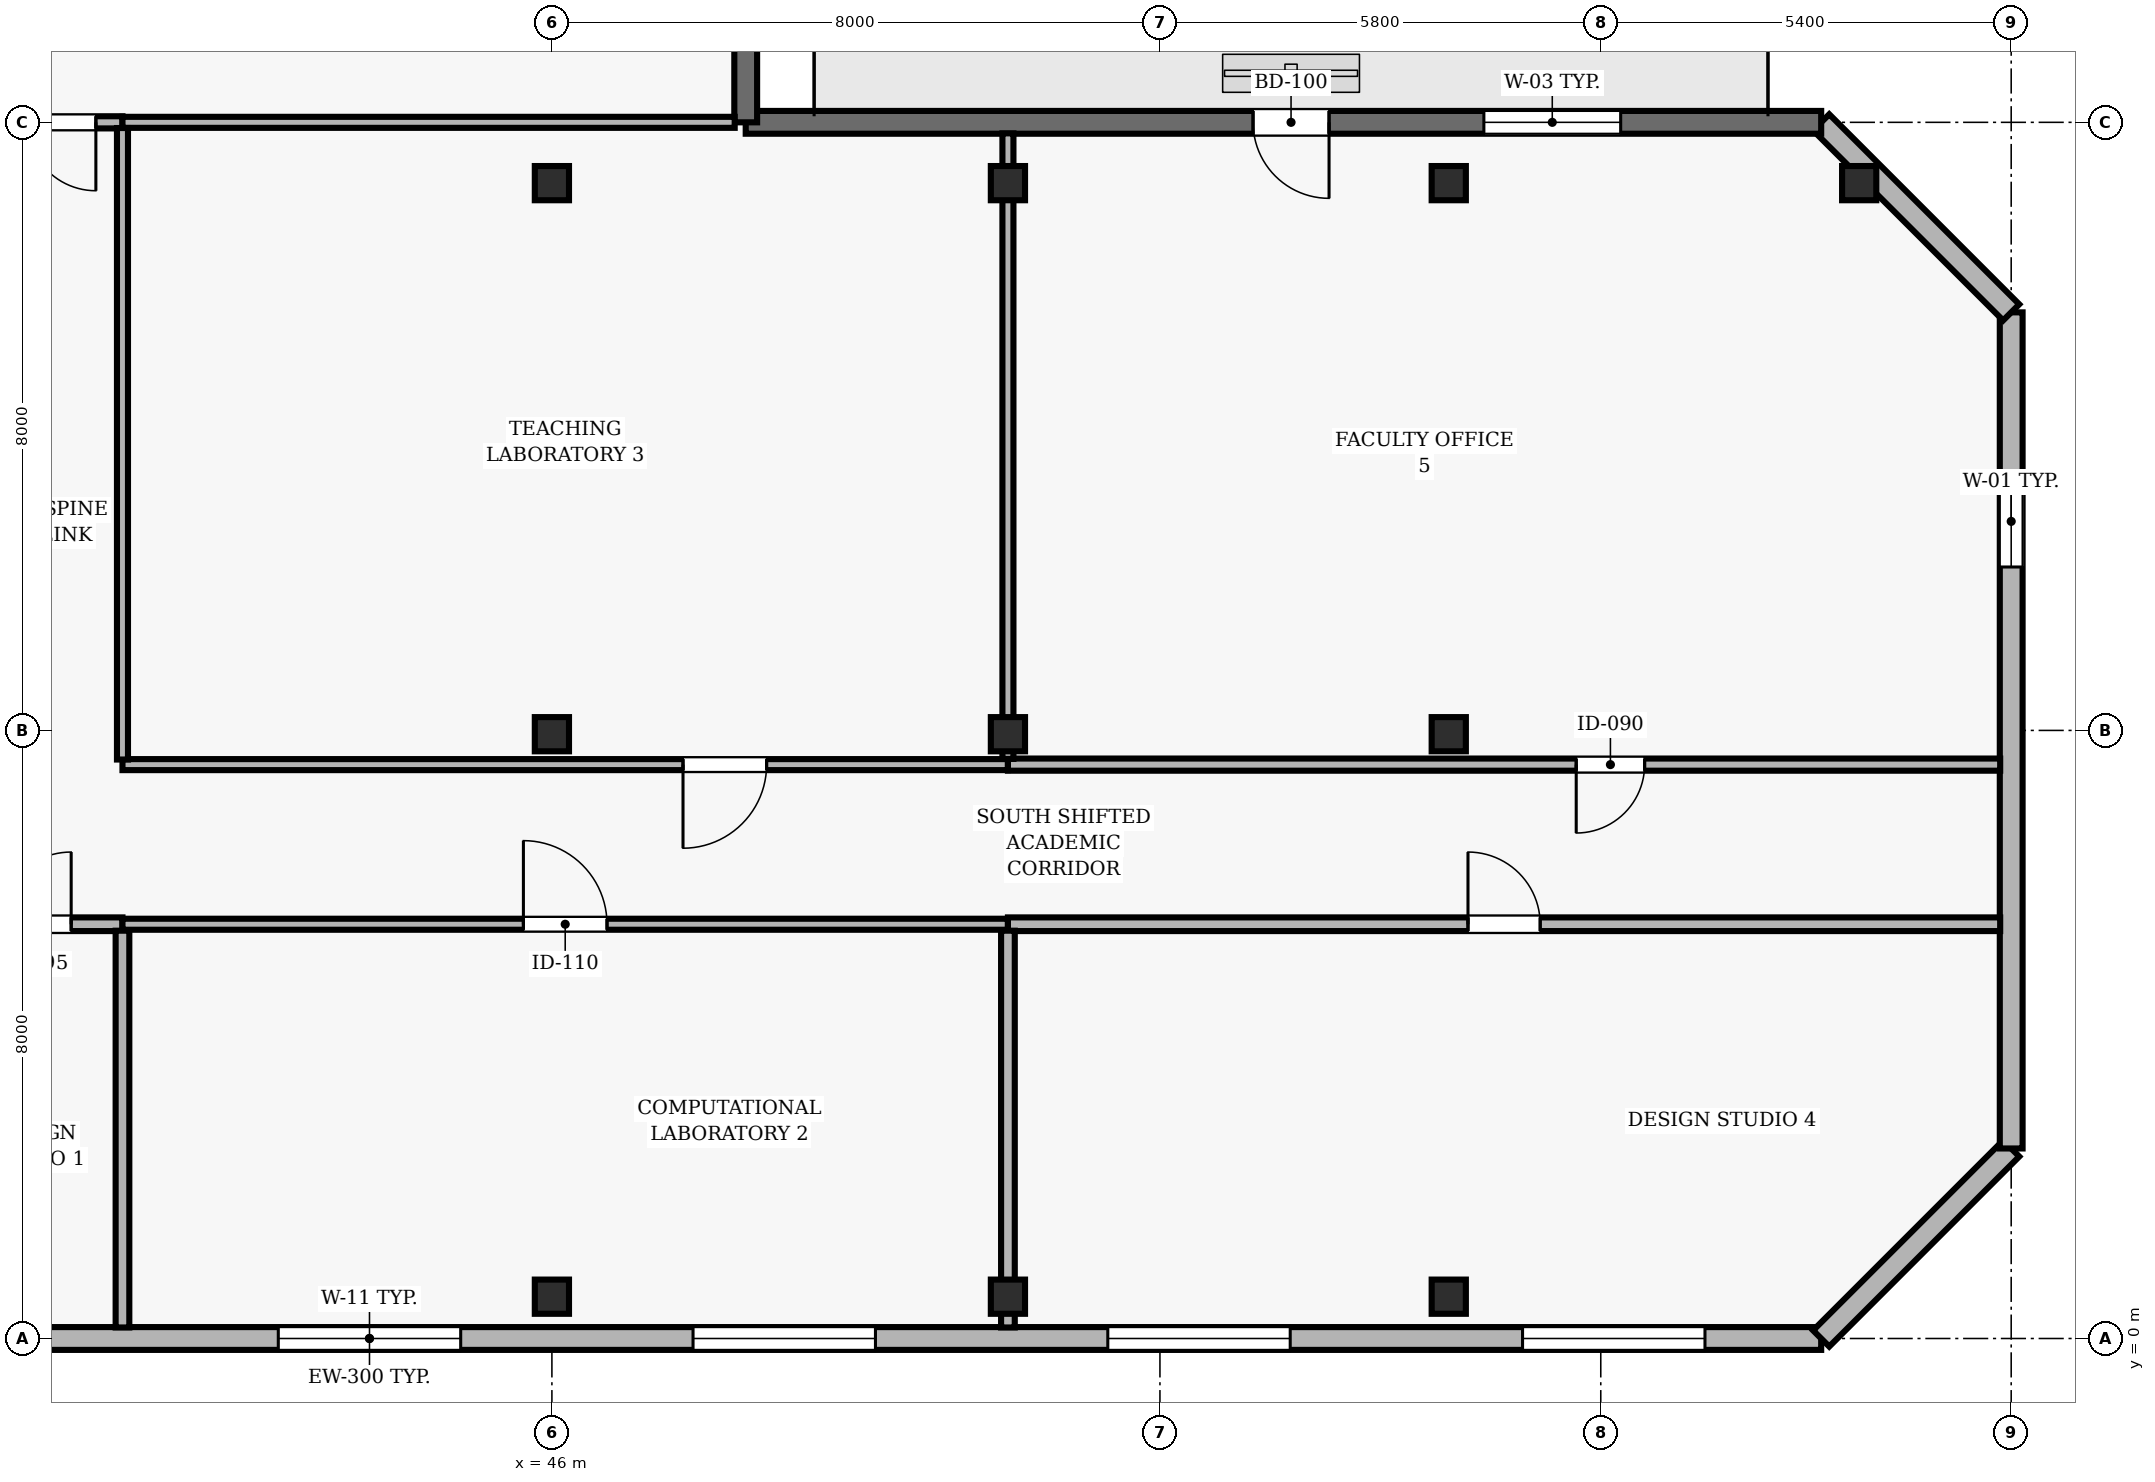
"""IFC4 building model, lengths in metres.
Left out: names, types, materials, properties, quantities, classifications, styles, units other than length and angle.
Written with IfcOpenShell. Run it as: python <this file> out.ifc"""

import sys

from ifc_helpers import new_model, si_unit, direction, frame, frame_2d, origin, origin_2d, place, context, subcontext, project, spatial, rectangle, hollow_rectangle, extrude, element, fill, save


model = new_model("IFC4")
c1 = context("Model", 3, precision=1e-05, world=origin(), true_north=direction((0.0, 1.0)))
c2 = subcontext(c1, "Body", "Model", "MODEL_VIEW")
j1 = project(units=[si_unit("LENGTHUNIT", "METRE"), si_unit("PLANEANGLEUNIT", "RADIAN")], contexts=[c1])
p1 = place(None, origin())
s1 = spatial("IfcSite", under=j1, at=p1, CompositionType="ELEMENT")
p2 = place(p1, origin())
s2 = spatial("IfcBuilding", under=s1, at=p2, CompositionType="ELEMENT")
p3 = place(p2, frame((0.0, 0.0, 191.4)))
s3 = spatial("IfcBuildingStorey", under=s2, at=p3, CompositionType="ELEMENT", Elevation=191.4)
for number, where, z_axis, x_axis in (
    (1, (46.0, 0.55, 0.0), (0.0, 0.0, 1.0), (1.0, 0.0, 0.0)),
    (2, (46.0, 7.95, 0.0), (0.0, 0.0, 1.0), (1.0, 0.0, 0.0)),
    (3, (46.0, 15.2, 0.0), (0.0, 0.0, 1.0), (1.0, 0.0, 0.0)),
    (4, (52.0, 0.55, 0.0), (0.0, 0.0, 1.0), (1.0, 0.0, 0.0)),
    (5, (52.0, 7.95, 0.0), (0.0, 0.0, 1.0), (1.0, 0.0, 0.0)),
    (6, (52.0, 15.2, 0.0), (0.0, 0.0, 1.0), (1.0, 0.0, 0.0)),
    (7, (57.8, 0.55, 0.0), (0.0, 0.0, 1.0), (1.0, 0.0, 0.0)),
    (8, (57.8, 7.95, 0.0), (0.0, 0.0, 1.0), (1.0, 0.0, 0.0)),
    (9, (57.8, 15.2, 0.0), (0.0, 0.0, 1.0), (1.0, 0.0, 0.0)),
    (10, (63.2, 15.2, 0.0), (0.0, 0.0, 1.0), (1.0, 0.0, 0.0)),
):
    element("IfcColumn", number, at=place(p3, frame(where, z_axis=z_axis, x_axis=x_axis)), inside=s3, PredefinedType="COLUMN", context=c2, shape_type="SweptSolid", body=[
        extrude(hollow_rectangle(XDim=0.45, YDim=0.45, WallThickness=0.02, at=origin_2d()), origin(), (0.0, 0.0, 1.0), 3.9),
    ])
p4 = place(p3, frame((24.5, 0.0, 0.0), z_axis=(0.0, 0.0, 1.0), x_axis=(1.0, 0.0, 0.0)))
e11 = element("IfcWall", 11, at=p4, inside=s3, PredefinedType="SOLIDWALL", context=c2, shape_type="SweptSolid", body=[
    extrude(rectangle(XDim=38.2, YDim=0.3, at=frame_2d((19.1, 0.0))), origin(), (0.0, 0.0, 1.0), 3.69),
])
p5 = place(p4, frame((1.529, 0.0, 0.9)))
e12 = element("IfcOpeningElement", 12, at=p5, cuts=e11, PredefinedType="OPENING", context=c2, shape_type="SweptSolid", body=[
    extrude(rectangle(XDim=2.4, YDim=2.2, at=frame_2d((1.2, 1.1))), frame((0.0, 0.16, 0.0), z_axis=(0.0, -1.0, 0.0), x_axis=(1.0, 0.0, 0.0)), (0.0, 0.0, 1.0), 0.32),
])
p6 = place(p4, frame((17.9, 0.0, 0.9)))
e13 = element("IfcOpeningElement", 13, at=p6, cuts=e11, PredefinedType="OPENING", context=c2, shape_type="SweptSolid", body=[
    extrude(rectangle(XDim=2.4, YDim=2.2, at=frame_2d((1.2, 1.1))), frame((0.0, 0.16, 0.0), z_axis=(0.0, -1.0, 0.0), x_axis=(1.0, 0.0, 0.0)), (0.0, 0.0, 1.0), 0.32),
])
p7 = place(p4, frame((23.357, 0.0, 0.9)))
e14 = element("IfcOpeningElement", 14, at=p7, cuts=e11, PredefinedType="OPENING", context=c2, shape_type="SweptSolid", body=[
    extrude(rectangle(XDim=2.4, YDim=2.2, at=frame_2d((1.2, 1.1))), frame((0.0, 0.16, 0.0), z_axis=(0.0, -1.0, 0.0), x_axis=(1.0, 0.0, 0.0)), (0.0, 0.0, 1.0), 0.32),
])
p8 = place(p4, frame((28.814, 0.0, 0.9)))
e15 = element("IfcOpeningElement", 15, at=p8, cuts=e11, PredefinedType="OPENING", context=c2, shape_type="SweptSolid", body=[
    extrude(rectangle(XDim=2.4, YDim=2.2, at=frame_2d((1.2, 1.1))), frame((0.0, 0.16, 0.0), z_axis=(0.0, -1.0, 0.0), x_axis=(1.0, 0.0, 0.0)), (0.0, 0.0, 1.0), 0.32),
])
p9 = place(p4, frame((34.271, 0.0, 0.9)))
e16 = element("IfcOpeningElement", 16, at=p9, cuts=e11, PredefinedType="OPENING", context=c2, shape_type="SweptSolid", body=[
    extrude(rectangle(XDim=2.4, YDim=2.2, at=frame_2d((1.2, 1.1))), frame((0.0, 0.16, 0.0), z_axis=(0.0, -1.0, 0.0), x_axis=(1.0, 0.0, 0.0)), (0.0, 0.0, 1.0), 0.32),
])
p10 = place(p3, frame((62.7, 0.0, 0.0), z_axis=(0.0, 0.0, 1.0), x_axis=(0.707106781187, 0.707106781187, 0.0)))
e17 = element("IfcWall", 17, at=p10, inside=s3, PredefinedType="SOLIDWALL", context=c2, shape_type="SweptSolid", body=[
    extrude(rectangle(XDim=3.536, YDim=0.3, at=frame_2d((1.768, 0.0))), origin(), (0.0, 0.0, 1.0), 3.69),
])
p11 = place(p3, frame((65.2, 2.5, 0.0), z_axis=(0.0, 0.0, 1.0), x_axis=(0.0, 1.0, 0.0)))
e18 = element("IfcWall", 18, at=p11, inside=s3, PredefinedType="SOLIDWALL", context=c2, shape_type="SweptSolid", body=[
    extrude(rectangle(XDim=11.0, YDim=0.3, at=frame_2d((5.5, 0.0))), origin(), (0.0, 0.0, 1.0), 3.69),
])
p12 = place(p11, frame((7.65, 0.0, 0.9)))
e19 = element("IfcOpeningElement", 19, at=p12, cuts=e18, PredefinedType="OPENING", context=c2, shape_type="SweptSolid", body=[
    extrude(rectangle(XDim=1.2, YDim=1.6, at=frame_2d((0.6, 0.8))), frame((0.0, 0.16, 0.0), z_axis=(0.0, -1.0, 0.0), x_axis=(1.0, 0.0, 0.0)), (0.0, 0.0, 1.0), 0.32),
])
p13 = place(p3, frame((65.2, 13.5, 0.0), z_axis=(0.0, 0.0, 1.0), x_axis=(-0.707106781187, 0.707106781187, 0.0)))
e20 = element("IfcWall", 20, at=p13, inside=s3, PredefinedType="SOLIDWALL", context=c2, shape_type="SweptSolid", body=[
    extrude(rectangle(XDim=3.536, YDim=0.3, at=frame_2d((1.768, 0.0))), origin(), (0.0, 0.0, 1.0), 3.69),
])
p14 = place(p3, frame((62.7, 16.0, 0.0), z_axis=(0.0, 0.0, 1.0), x_axis=(-1.0, 0.0, 0.0)))
e21 = element("IfcWall", 21, at=p14, inside=s3, PredefinedType="SOLIDWALL", context=c2, shape_type="SweptSolid", body=[
    extrude(rectangle(XDim=14.15, YDim=0.3, at=frame_2d((7.075, 0.0))), origin(), (0.0, 0.0, 1.0), 3.69),
])
p15 = place(p14, frame((6.475, 0.0, 0.0)))
e22 = element("IfcOpeningElement", 22, at=p15, cuts=e21, PredefinedType="OPENING", context=c2, shape_type="SweptSolid", body=[
    extrude(rectangle(XDim=1.0, YDim=2.2, at=frame_2d((0.5, 1.1))), frame((0.0, 0.16, 0.0), z_axis=(0.0, -1.0, 0.0), x_axis=(1.0, 0.0, 0.0)), (0.0, 0.0, 1.0), 0.32),
])
p16 = place(p14, frame((2.638, 0.0, 0.9)))
e23 = element("IfcOpeningElement", 23, at=p16, cuts=e21, PredefinedType="OPENING", context=c2, shape_type="SweptSolid", body=[
    extrude(rectangle(XDim=1.8, YDim=1.6, at=frame_2d((0.9, 0.8))), frame((0.0, 0.16, 0.0), z_axis=(0.0, -1.0, 0.0), x_axis=(1.0, 0.0, 0.0)), (0.0, 0.0, 1.0), 0.32),
])
p17 = place(p3, frame((48.55, 16.0, 0.0), z_axis=(0.0, 0.0, 1.0), x_axis=(0.0, 1.0, 0.0)))
e24 = element("IfcWall", 24, at=p17, inside=s3, PredefinedType="SOLIDWALL", context=c2, shape_type="SweptSolid", body=[
    extrude(rectangle(XDim=6.788, YDim=0.3, at=frame_2d((3.394, 0.0))), origin(), (0.0, 0.0, 1.0), 3.69),
])
p18 = place(p17, frame((2.344, 0.0, 0.9)))
e25 = element("IfcOpeningElement", 25, at=p18, cuts=e24, PredefinedType="OPENING", context=c2, shape_type="SweptSolid", body=[
    extrude(rectangle(XDim=2.1, YDim=1.6, at=frame_2d((1.05, 0.8))), frame((0.0, 0.16, 0.0), z_axis=(0.0, -1.0, 0.0), x_axis=(1.0, 0.0, 0.0)), (0.0, 0.0, 1.0), 0.32),
])
p19 = place(p3, frame((38.05, 5.45, 0.0), z_axis=(0.0, 0.0, 1.0), x_axis=(1.0, 0.0, 0.0)))
e26 = element("IfcWall", 26, at=p19, inside=s3, PredefinedType="PARTITIONING", context=c2, shape_type="SweptSolid", body=[
    extrude(rectangle(XDim=2.3, YDim=0.18, at=frame_2d((1.15, 0.0))), origin(), (0.0, 0.0, 1.0), 3.343),
])
p20 = place(p19, frame((0.675, 0.0, 0.0)))
e27 = element("IfcOpeningElement", 27, at=p20, cuts=e26, PredefinedType="OPENING", context=c2, shape_type="SweptSolid", body=[
    extrude(rectangle(XDim=0.95, YDim=2.1, at=frame_2d((0.475, 1.05))), frame((0.0, 0.1, 0.0), z_axis=(0.0, -1.0, 0.0), x_axis=(1.0, 0.0, 0.0)), (0.0, 0.0, 1.0), 0.2),
])
p21 = place(p3, frame((40.35, 5.45, 0.0), z_axis=(0.0, 0.0, 1.0), x_axis=(1.0, 0.0, 0.0)))
e28 = element("IfcWall", 28, at=p21, inside=s3, PredefinedType="PARTITIONING", context=c2, shape_type="SweptSolid", body=[
    extrude(rectangle(XDim=11.65, YDim=0.145, at=frame_2d((5.825, 0.0))), origin(), (0.0, 0.0, 1.0), 3.343),
])
p22 = place(p21, frame((5.275, 0.0, 0.0)))
e29 = element("IfcOpeningElement", 29, at=p22, cuts=e28, PredefinedType="OPENING", context=c2, shape_type="SweptSolid", body=[
    extrude(rectangle(XDim=1.1, YDim=2.15, at=frame_2d((0.55, 1.075))), frame((0.0, 0.083, 0.0), z_axis=(0.0, -1.0, 0.0), x_axis=(1.0, 0.0, 0.0)), (0.0, 0.0, 1.0), 0.165),
])
p23 = place(p3, frame((40.35, 16.0, 0.0), z_axis=(0.0, 0.0, 1.0), x_axis=(-1.0, 0.0, 0.0)))
e30 = element("IfcWall", 30, at=p23, inside=s3, PredefinedType="PARTITIONING", context=c2, shape_type="SweptSolid", body=[
    extrude(rectangle(XDim=2.3, YDim=0.16, at=frame_2d((1.15, 0.0))), origin(), (0.0, 0.0, 1.0), 3.69),
])
p24 = place(p23, frame((0.35, 0.0, 0.0)))
e31 = element("IfcOpeningElement", 31, at=p24, cuts=e30, PredefinedType="OPENING", context=c2, shape_type="SweptSolid", body=[
    extrude(rectangle(XDim=0.9, YDim=2.1, at=frame_2d((0.45, 1.05))), frame((0.0, 0.09, 0.0), z_axis=(0.0, -1.0, 0.0), x_axis=(1.0, 0.0, 0.0)), (0.0, 0.0, 1.0), 0.18),
])
p25 = place(p3, frame((40.35, 16.0, 0.0), z_axis=(0.0, 0.0, 1.0), x_axis=(1.0, 0.0, 0.0)))
e32 = element("IfcWall", 32, at=p25, inside=s3, PredefinedType="PARTITIONING", context=c2, shape_type="SweptSolid", body=[
    extrude(rectangle(XDim=8.055, YDim=0.145, at=frame_2d((4.027, 0.0))), origin(), (0.0, 0.0, 1.0), 3.39),
])
p26 = place(p3, frame((52.0, 5.45, 0.0), z_axis=(0.0, 0.0, 1.0), x_axis=(1.0, 0.0, 0.0)))
e33 = element("IfcWall", 33, at=p26, inside=s3, PredefinedType="PARTITIONING", context=c2, shape_type="SweptSolid", body=[
    extrude(rectangle(XDim=13.055, YDim=0.18, at=frame_2d((6.527, 0.0))), origin(), (0.0, 0.0, 1.0), 3.343),
])
p27 = place(p26, frame((6.053, 0.0, 0.0)))
e34 = element("IfcOpeningElement", 34, at=p27, cuts=e33, PredefinedType="OPENING", context=c2, shape_type="SweptSolid", body=[
    extrude(rectangle(XDim=0.95, YDim=2.1, at=frame_2d((0.475, 1.05))), frame((0.0, 0.1, 0.0), z_axis=(0.0, -1.0, 0.0), x_axis=(1.0, 0.0, 0.0)), (0.0, 0.0, 1.0), 0.2),
])
p28 = place(p3, frame((52.0, 7.55, 0.0), z_axis=(0.0, 0.0, 1.0), x_axis=(-1.0, 0.0, 0.0)))
e35 = element("IfcWall", 35, at=p28, inside=s3, PredefinedType="PARTITIONING", context=c2, shape_type="SweptSolid", body=[
    extrude(rectangle(XDim=11.65, YDim=0.145, at=frame_2d((5.825, 0.0))), origin(), (0.0, 0.0, 1.0), 3.139),
])
p29 = place(p28, frame((3.175, 0.0, 0.0)))
e36 = element("IfcOpeningElement", 36, at=p29, cuts=e35, PredefinedType="OPENING", context=c2, shape_type="SweptSolid", body=[
    extrude(rectangle(XDim=1.1, YDim=2.15, at=frame_2d((0.55, 1.075))), frame((0.0, 0.083, 0.0), z_axis=(0.0, -1.0, 0.0), x_axis=(1.0, 0.0, 0.0)), (0.0, 0.0, 1.0), 0.165),
])
p30 = place(p3, frame((65.055, 7.55, 0.0), z_axis=(0.0, 0.0, 1.0), x_axis=(-1.0, 0.0, 0.0)))
e37 = element("IfcWall", 37, at=p30, inside=s3, PredefinedType="PARTITIONING", context=c2, shape_type="SweptSolid", body=[
    extrude(rectangle(XDim=13.055, YDim=0.16, at=frame_2d((6.527, 0.0))), origin(), (0.0, 0.0, 1.0), 3.139),
])
p31 = place(p30, frame((4.678, 0.0, 0.0)))
e38 = element("IfcOpeningElement", 38, at=p31, cuts=e37, PredefinedType="OPENING", context=c2, shape_type="SweptSolid", body=[
    extrude(rectangle(XDim=0.9, YDim=2.1, at=frame_2d((0.45, 1.05))), frame((0.0, 0.09, 0.0), z_axis=(0.0, -1.0, 0.0), x_axis=(1.0, 0.0, 0.0)), (0.0, 0.0, 1.0), 0.18),
])
p32 = place(p3, frame((40.35, 0.145, 0.0), z_axis=(0.0, 0.0, 1.0), x_axis=(0.0, 1.0, 0.0)))
e39 = element("IfcWall", 39, at=p32, inside=s3, PredefinedType="PARTITIONING", context=c2, shape_type="SweptSolid", body=[
    extrude(rectangle(XDim=5.22, YDim=0.18, at=frame_2d((2.61, 0.0))), origin(), (0.0, 0.0, 1.0), 3.69),
])
p33 = place(p3, frame((40.35, 7.617, 0.0), z_axis=(0.0, 0.0, 1.0), x_axis=(0.0, 1.0, 0.0)))
e40 = element("IfcWall", 40, at=p33, inside=s3, PredefinedType="PARTITIONING", context=c2, shape_type="SweptSolid", body=[
    extrude(rectangle(XDim=8.308, YDim=0.145, at=frame_2d((4.154, 0.0))), origin(), (0.0, 0.0, 1.0), 3.343),
])
p34 = place(p3, frame((52.0, 0.145, 0.0), z_axis=(0.0, 0.0, 1.0), x_axis=(0.0, 1.0, 0.0)))
e41 = element("IfcWall", 41, at=p34, inside=s3, PredefinedType="PARTITIONING", context=c2, shape_type="SweptSolid", body=[
    extrude(rectangle(XDim=5.22, YDim=0.18, at=frame_2d((2.61, 0.0))), origin(), (0.0, 0.0, 1.0), 3.139),
])
p35 = place(p3, frame((52.0, 7.625, 0.0), z_axis=(0.0, 0.0, 1.0), x_axis=(0.0, 1.0, 0.0)))
e42 = element("IfcWall", 42, at=p35, inside=s3, PredefinedType="PARTITIONING", context=c2, shape_type="SweptSolid", body=[
    extrude(rectangle(XDim=8.23, YDim=0.145, at=frame_2d((4.115, 0.0))), origin(), (0.0, 0.0, 1.0), 3.139),
])
p36 = place(p6, origin())
e43 = element("IfcWindow", 43, at=p36, inside=s3, PartitioningType="SINGLE_PANEL", PredefinedType="WINDOW", context=c2, shape_type="SweptSolid", body=[
    extrude(rectangle(XDim=2.4, YDim=2.2, at=frame_2d((1.2, 1.1))), frame((0.0, 0.03, 0.0), z_axis=(0.0, -1.0, 0.0), x_axis=(1.0, 0.0, 0.0)), (0.0, 0.0, 1.0), 0.06),
])
fill(e13, e43)
p37 = place(p7, origin())
e44 = element("IfcWindow", 44, at=p37, inside=s3, PartitioningType="SINGLE_PANEL", PredefinedType="WINDOW", context=c2, shape_type="SweptSolid", body=[
    extrude(rectangle(XDim=2.4, YDim=2.2, at=frame_2d((1.2, 1.1))), frame((0.0, 0.03, 0.0), z_axis=(0.0, -1.0, 0.0), x_axis=(1.0, 0.0, 0.0)), (0.0, 0.0, 1.0), 0.06),
])
fill(e14, e44)
p38 = place(p8, origin())
e45 = element("IfcWindow", 45, at=p38, inside=s3, PartitioningType="SINGLE_PANEL", PredefinedType="WINDOW", context=c2, shape_type="SweptSolid", body=[
    extrude(rectangle(XDim=2.4, YDim=2.2, at=frame_2d((1.2, 1.1))), frame((0.0, 0.03, 0.0), z_axis=(0.0, -1.0, 0.0), x_axis=(1.0, 0.0, 0.0)), (0.0, 0.0, 1.0), 0.06),
])
fill(e15, e45)
p39 = place(p9, origin())
e46 = element("IfcWindow", 46, at=p39, inside=s3, PartitioningType="SINGLE_PANEL", PredefinedType="WINDOW", context=c2, shape_type="SweptSolid", body=[
    extrude(rectangle(XDim=2.4, YDim=2.2, at=frame_2d((1.2, 1.1))), frame((0.0, 0.03, 0.0), z_axis=(0.0, -1.0, 0.0), x_axis=(1.0, 0.0, 0.0)), (0.0, 0.0, 1.0), 0.06),
])
fill(e16, e46)
p40 = place(p12, origin())
e47 = element("IfcWindow", 47, at=p40, inside=s3, PartitioningType="SINGLE_PANEL", PredefinedType="WINDOW", context=c2, shape_type="SweptSolid", body=[
    extrude(rectangle(XDim=1.2, YDim=1.6, at=frame_2d((0.6, 0.8))), frame((0.0, 0.03, 0.0), z_axis=(0.0, -1.0, 0.0), x_axis=(1.0, 0.0, 0.0)), (0.0, 0.0, 1.0), 0.06),
])
fill(e19, e47)
p41 = place(p15, origin())
e48 = element("IfcDoor", 48, at=p41, inside=s3, OperationType="SINGLE_SWING_LEFT", PredefinedType="DOOR", context=c2, shape_type="SweptSolid", body=[
    extrude(rectangle(XDim=1.0, YDim=2.2, at=frame_2d((0.5, 1.1))), frame((0.0, 0.025, 0.0), z_axis=(0.0, -1.0, 0.0), x_axis=(1.0, 0.0, 0.0)), (0.0, 0.0, 1.0), 0.05),
])
fill(e22, e48)
p42 = place(p16, origin())
e49 = element("IfcWindow", 49, at=p42, inside=s3, PartitioningType="SINGLE_PANEL", PredefinedType="WINDOW", context=c2, shape_type="SweptSolid", body=[
    extrude(rectangle(XDim=1.8, YDim=1.6, at=frame_2d((0.9, 0.8))), frame((0.0, 0.03, 0.0), z_axis=(0.0, -1.0, 0.0), x_axis=(1.0, 0.0, 0.0)), (0.0, 0.0, 1.0), 0.06),
])
fill(e23, e49)
p43 = place(p20, origin())
e50 = element("IfcDoor", 50, at=p43, inside=s3, OperationType="SINGLE_SWING_RIGHT", PredefinedType="DOOR", context=c2, shape_type="SweptSolid", body=[
    extrude(rectangle(XDim=0.95, YDim=2.1, at=frame_2d((0.475, 1.05))), frame((0.0, 0.025, 0.0), z_axis=(0.0, -1.0, 0.0), x_axis=(1.0, 0.0, 0.0)), (0.0, 0.0, 1.0), 0.05),
])
fill(e27, e50)
p44 = place(p22, origin())
e51 = element("IfcDoor", 51, at=p44, inside=s3, OperationType="SINGLE_SWING_LEFT", PredefinedType="DOOR", context=c2, shape_type="SweptSolid", body=[
    extrude(rectangle(XDim=1.1, YDim=2.15, at=frame_2d((0.55, 1.075))), frame((0.0, 0.025, 0.0), z_axis=(0.0, -1.0, 0.0), x_axis=(1.0, 0.0, 0.0)), (0.0, 0.0, 1.0), 0.05),
])
fill(e29, e51)
p45 = place(p29, origin())
e52 = element("IfcDoor", 52, at=p45, inside=s3, OperationType="SINGLE_SWING_RIGHT", PredefinedType="DOOR", context=c2, shape_type="SweptSolid", body=[
    extrude(rectangle(XDim=1.1, YDim=2.15, at=frame_2d((0.55, 1.075))), frame((0.0, 0.025, 0.0), z_axis=(0.0, -1.0, 0.0), x_axis=(1.0, 0.0, 0.0)), (0.0, 0.0, 1.0), 0.05),
])
fill(e36, e52)
p46 = place(p27, origin())
e53 = element("IfcDoor", 53, at=p46, inside=s3, OperationType="SINGLE_SWING_LEFT", PredefinedType="DOOR", context=c2, shape_type="SweptSolid", body=[
    extrude(rectangle(XDim=0.95, YDim=2.1, at=frame_2d((0.475, 1.05))), frame((0.0, 0.025, 0.0), z_axis=(0.0, -1.0, 0.0), x_axis=(1.0, 0.0, 0.0)), (0.0, 0.0, 1.0), 0.05),
])
fill(e34, e53)
p47 = place(p31, origin())
e54 = element("IfcDoor", 54, at=p47, inside=s3, OperationType="SINGLE_SWING_RIGHT", PredefinedType="DOOR", context=c2, shape_type="SweptSolid", body=[
    extrude(rectangle(XDim=0.9, YDim=2.1, at=frame_2d((0.45, 1.05))), frame((0.0, 0.025, 0.0), z_axis=(0.0, -1.0, 0.0), x_axis=(1.0, 0.0, 0.0)), (0.0, 0.0, 1.0), 0.05),
])
fill(e38, e54)
p48 = place(p24, origin())
e55 = element("IfcDoor", 55, at=p48, inside=s3, OperationType="SINGLE_SWING_LEFT", PredefinedType="DOOR", context=c2, shape_type="SweptSolid", body=[
    extrude(rectangle(XDim=0.9, YDim=2.1, at=frame_2d((0.45, 1.05))), frame((0.0, 0.025, 0.0), z_axis=(0.0, -1.0, 0.0), x_axis=(1.0, 0.0, 0.0)), (0.0, 0.0, 1.0), 0.05),
])
fill(e31, e55)
save(model, sys.argv[1])
